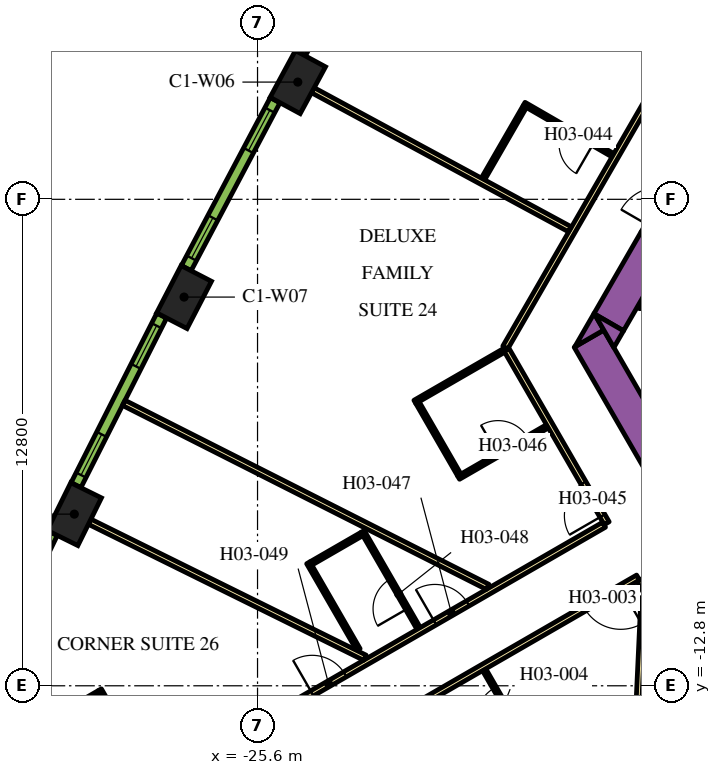
"""IFC4 building model, lengths in metres.
Left out: names, types, materials, properties, quantities, classifications, styles, units other than length and angle.
Written with IfcOpenShell. Run it as: python <this file> out.ifc"""

import sys

from ifc_helpers import new_model, si_unit, direction, frame, frame_2d, origin, origin_2d, place, context, subcontext, project, spatial, polyline, rectangle, outline, extrude, element, fill, save


model = new_model("IFC4")
c1 = context("Model", 3, precision=1e-05, world=origin(), true_north=direction((0.0, 1.0)))
c2 = subcontext(c1, "Body", "Model", "MODEL_VIEW")
j1 = project(units=[si_unit("LENGTHUNIT", "METRE"), si_unit("PLANEANGLEUNIT", "RADIAN")], contexts=[c1])
p1 = place(None, origin())
s1 = spatial("IfcSite", under=j1, at=p1, CompositionType="ELEMENT")
p2 = place(p1, origin())
s2 = spatial("IfcBuilding", under=s1, at=p2, CompositionType="ELEMENT")
p3 = place(p2, frame((0.0, 0.0, 54.9)))
s3 = spatial("IfcBuildingStorey", under=s2, at=p3, CompositionType="ELEMENT", Elevation=54.9)
for number, where, z_axis, x_axis in (
    (1, (-24.54, 3.085, 0.0), (0.0, 0.0, 1.0), (-0.476, -0.88, 0.0)),
    (2, (-27.533, -2.572, 0.0), (0.0, 0.0, 1.0), (-0.459, -0.888, 0.0)),
    (3, (-30.421, -8.284, 0.0), (0.0, 0.0, 1.0), (-0.443, -0.897, 0.0)),
):
    element("IfcColumn", number, at=place(p3, frame(where, z_axis=z_axis, x_axis=x_axis)), inside=s3, PredefinedType="COLUMN", context=c2, shape_type="SweptSolid", body=[
        extrude(rectangle(XDim=1.4, YDim=0.9, at=origin_2d()), origin(), (0.0, 0.0, 1.0), 3.9),
    ])
p4 = place(p3, frame((-12.134, -11.883, 0.0), z_axis=(0.0, 0.0, 1.0), x_axis=(-0.500005339912, 0.866022320763, 0.0)))
e4 = element("IfcWall", 4, at=p4, inside=s3, PredefinedType="SOLIDWALL", context=c2, shape_type="SweptSolid", body=[
    extrude(rectangle(XDim=9.488, YDim=0.9, at=frame_2d((4.744, 0.0))), origin(), (0.0, 0.0, 1.0), 3.9),
])
p5 = place(p3, origin())
e5 = element("IfcWall", 5, at=p5, inside=s3, PredefinedType="SOLIDWALL", context=c2, shape_type="SweptSolid", body=[
    extrude(outline(polyline([(-16.489, -3.44), (-17.251, -3.88), (-16.743, -3.0), (-16.489, -3.44)])), origin(), (0.0, 0.0, 1.0), 3.9),
])
p6 = place(p3, frame((-15.118, -1.085, 0.0), z_axis=(0.0, 0.0, 1.0), x_axis=(-0.50006606081, -0.865987260198, 0.0)))
e6 = element("IfcWall", 6, at=p6, inside=s3, PredefinedType="SOLIDWALL", context=c2, shape_type="SweptSolid", body=[
    extrude(rectangle(XDim=2.481, YDim=0.9, at=frame_2d((1.24, 0.0))), origin(), (0.0, 0.0, 1.0), 3.9),
])
e7 = element("IfcWall", 7, at=p5, inside=s3, PredefinedType="SOLIDWALL", context=c2, shape_type="SweptSolid", body=[
    extrude(outline(polyline([(-16.223, -3.9), (-16.732, -3.02), (-15.969, -3.46), (-16.223, -3.9)])), origin(), (0.0, 0.0, 1.0), 3.9),
])
p7 = place(p3, frame((-12.915, -2.8, 0.0), z_axis=(0.0, 0.0, 1.0), x_axis=(-1.0, 0.0, 0.0)))
e8 = element("IfcWall", 8, at=p7, inside=s3, PredefinedType="PARTITIONING", context=c2, shape_type="SweptSolid", body=[
    extrude(rectangle(XDim=2.637, YDim=0.15, at=frame_2d((1.318, 0.0))), origin(), (0.0, 0.0, 1.0), 2.75),
])
p8 = place(p3, frame((-19.081, -3.9, 0.0), z_axis=(0.0, 0.0, 1.0), x_axis=(0.499998313975, 0.866026377209, 0.0)))
e9 = element("IfcWall", 9, at=p8, inside=s3, PredefinedType="PARTITIONING", context=c2, shape_type="SweptSolid", body=[
    extrude(rectangle(XDim=25.766, YDim=0.15, at=frame_2d((12.883, 0.0))), origin(), (0.0, 0.0, 1.0), 2.75),
])
p9 = place(p8, frame((22.445, 0.0, 0.0)))
e10 = element("IfcOpeningElement", 10, at=p9, cuts=e9, PredefinedType="OPENING", context=c2, shape_type="SweptSolid", body=[
    extrude(rectangle(XDim=1.0, YDim=2.1, at=frame_2d((0.5, 1.05))), frame((0.0, 0.085, 0.0), z_axis=(0.0, -1.0, 0.0), x_axis=(1.0, 0.0, 0.0)), (0.0, 0.0, 1.0), 0.17),
])
p10 = place(p8, frame((21.138, 0.0, 0.0)))
e11 = element("IfcOpeningElement", 11, at=p10, cuts=e9, PredefinedType="OPENING", context=c2, shape_type="SweptSolid", body=[
    extrude(rectangle(XDim=1.0, YDim=2.1, at=frame_2d((0.5, 1.05))), frame((0.0, 0.085, 0.0), z_axis=(0.0, -1.0, 0.0), x_axis=(1.0, 0.0, 0.0)), (0.0, 0.0, 1.0), 0.17),
])
p11 = place(p8, frame((14.066, 0.0, 0.0)))
e12 = element("IfcOpeningElement", 12, at=p11, cuts=e9, PredefinedType="OPENING", context=c2, shape_type="SweptSolid", body=[
    extrude(rectangle(XDim=0.9, YDim=2.1, at=frame_2d((0.45, 1.05))), frame((0.0, 0.085, 0.0), z_axis=(0.0, -1.0, 0.0), x_axis=(1.0, 0.0, 0.0)), (0.0, 0.0, 1.0), 0.17),
])
p12 = place(p8, frame((11.693, 0.0, 0.0)))
e13 = element("IfcOpeningElement", 13, at=p12, cuts=e9, PredefinedType="OPENING", context=c2, shape_type="SweptSolid", body=[
    extrude(rectangle(XDim=1.0, YDim=2.1, at=frame_2d((0.5, 1.05))), frame((0.0, 0.085, 0.0), z_axis=(0.0, -1.0, 0.0), x_axis=(1.0, 0.0, 0.0)), (0.0, 0.0, 1.0), 0.17),
])
p13 = place(p3, frame((-16.412, -8.523, 0.0), z_axis=(0.0, 0.0, 1.0), x_axis=(-0.500001929737, 0.866024289647, 0.0)))
e14 = element("IfcWall", 14, at=p13, inside=s3, PredefinedType="PARTITIONING", context=c2, shape_type="SweptSolid", body=[
    extrude(rectangle(XDim=5.268, YDim=0.15, at=frame_2d((2.634, 0.0))), origin(), (0.0, 0.0, 1.0), 2.75),
])
p14 = place(p13, frame((0.226, 0.0, 0.0)))
e15 = element("IfcOpeningElement", 15, at=p14, cuts=e14, PredefinedType="OPENING", context=c2, shape_type="SweptSolid", body=[
    extrude(rectangle(XDim=1.0, YDim=2.1, at=frame_2d((0.5, 1.05))), frame((0.0, 0.085, 0.0), z_axis=(0.0, -1.0, 0.0), x_axis=(1.0, 0.0, 0.0)), (0.0, 0.0, 1.0), 0.17),
])
p15 = place(p3, frame((-30.463, -16.635, 0.0), z_axis=(0.0, 0.0, 1.0), x_axis=(0.866022394896, 0.500005211512, 0.0)))
e16 = element("IfcWall", 16, at=p15, inside=s3, PredefinedType="PARTITIONING", context=c2, shape_type="SweptSolid", body=[
    extrude(rectangle(XDim=16.144, YDim=0.15, at=frame_2d((8.072, 0.0))), origin(), (0.0, 0.0, 1.0), 2.75),
])
p16 = place(p15, frame((11.004, 0.0, 0.0)))
e17 = element("IfcOpeningElement", 17, at=p16, cuts=e16, PredefinedType="OPENING", context=c2, shape_type="SweptSolid", body=[
    extrude(rectangle(XDim=1.0, YDim=2.1, at=frame_2d((0.5, 1.05))), frame((0.0, 0.085, 0.0), z_axis=(0.0, -1.0, 0.0), x_axis=(1.0, 0.0, 0.0)), (0.0, 0.0, 1.0), 0.17),
])
p17 = place(p15, frame((7.274, 0.0, 0.0)))
e18 = element("IfcOpeningElement", 18, at=p17, cuts=e16, PredefinedType="OPENING", context=c2, shape_type="SweptSolid", body=[
    extrude(rectangle(XDim=1.0, YDim=2.1, at=frame_2d((0.5, 1.05))), frame((0.0, 0.085, 0.0), z_axis=(0.0, -1.0, 0.0), x_axis=(1.0, 0.0, 0.0)), (0.0, 0.0, 1.0), 0.17),
])
p18 = place(p3, frame((-15.587, -9.952, 0.0), z_axis=(0.0, 0.0, 1.0), x_axis=(-0.866022197818, -0.500005552856, 0.0)))
e19 = element("IfcWall", 19, at=p18, inside=s3, PredefinedType="PARTITIONING", context=c2, shape_type="SweptSolid", body=[
    extrude(rectangle(XDim=16.224, YDim=0.15, at=frame_2d((8.112, 0.0))), origin(), (0.0, 0.0, 1.0), 2.75),
])
p19 = place(p18, frame((7.949, 0.0, 0.0)))
e20 = element("IfcOpeningElement", 20, at=p19, cuts=e19, PredefinedType="OPENING", context=c2, shape_type="SweptSolid", body=[
    extrude(rectangle(XDim=1.0, YDim=2.1, at=frame_2d((0.5, 1.05))), frame((0.0, 0.085, 0.0), z_axis=(0.0, -1.0, 0.0), x_axis=(1.0, 0.0, 0.0)), (0.0, 0.0, 1.0), 0.17),
])
p20 = place(p18, frame((0.525, 0.0, 0.0)))
e21 = element("IfcOpeningElement", 21, at=p20, cuts=e19, PredefinedType="OPENING", context=c2, shape_type="SweptSolid", body=[
    extrude(rectangle(XDim=1.1, YDim=2.1, at=frame_2d((0.55, 1.05))), frame((0.0, 0.085, 0.0), z_axis=(0.0, -1.0, 0.0), x_axis=(1.0, 0.0, 0.0)), (0.0, 0.0, 1.0), 0.17),
])
p21 = place(p3, frame((-12.918, -14.575, 0.0), z_axis=(0.0, 0.0, 1.0), x_axis=(-0.500009150678, 0.866020120573, 0.0)))
e22 = element("IfcWall", 22, at=p21, inside=s3, PredefinedType="PARTITIONING", context=c2, shape_type="SweptSolid", body=[
    extrude(rectangle(XDim=5.258, YDim=0.15, at=frame_2d((2.629, 0.0))), origin(), (0.0, 0.0, 1.0), 2.75),
])
p22 = place(p3, frame((-30.018, -8.483, 0.0), z_axis=(0.0, 0.0, 1.0), x_axis=(0.896544505264, -0.44295366584, 0.0)))
e23 = element("IfcWall", 23, at=p22, inside=s3, PredefinedType="PARTITIONING", context=c2, shape_type="SweptSolid", body=[
    extrude(rectangle(XDim=8.079, YDim=0.15, at=frame_2d((4.04, 0.0))), origin(), (0.0, 0.0, 1.0), 2.75),
])
p23 = place(p3, frame((-29.12, -5.356, 0.0), z_axis=(0.0, 0.0, 1.0), x_axis=(0.892401965553, -0.451241323327, 0.0)))
e24 = element("IfcWall", 24, at=p23, inside=s3, PredefinedType="PARTITIONING", context=c2, shape_type="SweptSolid", body=[
    extrude(rectangle(XDim=10.729, YDim=0.15, at=frame_2d((5.364, 0.0))), origin(), (0.0, 0.0, 1.0), 2.75),
])
p24 = place(p3, frame((-24.145, 2.871, 0.0), z_axis=(0.0, 0.0, 1.0), x_axis=(0.879551725039, -0.475803281809, 0.0)))
e25 = element("IfcWall", 25, at=p24, inside=s3, PredefinedType="PARTITIONING", context=c2, shape_type="SweptSolid", body=[
    extrude(rectangle(XDim=7.688, YDim=0.15, at=frame_2d((3.844, 0.0))), origin(), (0.0, 0.0, 1.0), 2.75),
])
p25 = place(p3, frame((-15.973, -22.109, 0.0), z_axis=(0.0, 0.0, 1.0), x_axis=(0.046191717129, 0.998932592955, 0.0)))
e26 = element("IfcWall", 26, at=p25, inside=s3, PredefinedType="PARTITIONING", context=c2, shape_type="SweptSolid", body=[
    extrude(rectangle(XDim=11.638, YDim=0.15, at=frame_2d((5.819, 0.0))), origin(), (0.0, 0.0, 1.0), 2.75),
])
p26 = place(p3, frame((-18.237, -14.802, 0.0), z_axis=(0.0, 0.0, 1.0), x_axis=(-0.49994636267, 0.866056369097, 0.0)))
e27 = element("IfcWall", 27, at=p26, inside=s3, PredefinedType="PARTITIONING", context=c2, shape_type="SweptSolid", body=[
    extrude(rectangle(XDim=2.8, YDim=0.1, at=frame_2d((1.4, 0.0))), origin(), (0.0, 0.0, 1.0), 2.75),
])
p27 = place(p26, frame((1.25, 0.0, 0.0)))
e28 = element("IfcOpeningElement", 28, at=p27, cuts=e27, PredefinedType="OPENING", context=c2, shape_type="SweptSolid", body=[
    extrude(rectangle(XDim=1.0, YDim=2.1, at=frame_2d((0.5, 1.05))), frame((0.0, 0.06, 0.0), z_axis=(0.0, -1.0, 0.0), x_axis=(1.0, 0.0, 0.0)), (0.0, 0.0, 1.0), 0.12),
])
p28 = place(p3, frame((-16.247, 1.159, 0.0), z_axis=(0.0, 0.0, 1.0), x_axis=(-0.866059108428, 0.4999416173, 0.0)))
e29 = element("IfcWall", 29, at=p28, inside=s3, PredefinedType="PARTITIONING", context=c2, shape_type="SweptSolid", body=[
    extrude(rectangle(XDim=2.7, YDim=0.1, at=frame_2d((1.35, 0.0))), origin(), (0.0, 0.0, 1.0), 2.75),
])
p29 = place(p28, frame((0.6, 0.0, 0.0)))
e30 = element("IfcOpeningElement", 30, at=p29, cuts=e29, PredefinedType="OPENING", context=c2, shape_type="SweptSolid", body=[
    extrude(rectangle(XDim=0.9, YDim=2.1, at=frame_2d((0.45, 1.05))), frame((0.0, 0.06, 0.0), z_axis=(0.0, -1.0, 0.0), x_axis=(1.0, 0.0, 0.0)), (0.0, 0.0, 1.0), 0.12),
])
p30 = place(p3, frame((-18.567, 2.441, 0.0), z_axis=(0.0, 0.0, 1.0), x_axis=(-0.499946605688, -0.86605622881, 0.0)))
e31 = element("IfcWall", 31, at=p30, inside=s3, PredefinedType="PARTITIONING", context=c2, shape_type="SweptSolid", body=[
    extrude(rectangle(XDim=2.2, YDim=0.1, at=frame_2d((1.1, 0.0))), origin(), (0.0, 0.0, 1.0), 2.75),
])
p31 = place(p3, frame((-20.31, -7.323, 0.0), z_axis=(0.0, 0.0, 1.0), x_axis=(0.86599734893, 0.500048589285, 0.0)))
e32 = element("IfcWall", 32, at=p31, inside=s3, PredefinedType="PARTITIONING", context=c2, shape_type="SweptSolid", body=[
    extrude(rectangle(XDim=2.7, YDim=0.1, at=frame_2d((1.35, 0.0))), origin(), (0.0, 0.0, 1.0), 2.75),
])
p32 = place(p31, frame((1.2, 0.0, 0.0)))
e33 = element("IfcOpeningElement", 33, at=p32, cuts=e32, PredefinedType="OPENING", context=c2, shape_type="SweptSolid", body=[
    extrude(rectangle(XDim=0.9, YDim=2.1, at=frame_2d((0.45, 1.05))), frame((0.0, 0.06, 0.0), z_axis=(0.0, -1.0, 0.0), x_axis=(1.0, 0.0, 0.0)), (0.0, 0.0, 1.0), 0.12),
])
p33 = place(p3, frame((-20.291, -7.254, 0.0), z_axis=(0.0, 0.0, 1.0), x_axis=(-0.50002983664, 0.866008176907, 0.0)))
e34 = element("IfcWall", 34, at=p33, inside=s3, PredefinedType="PARTITIONING", context=c2, shape_type="SweptSolid", body=[
    extrude(rectangle(XDim=2.2, YDim=0.1, at=frame_2d((1.1, 0.0))), origin(), (0.0, 0.0, 1.0), 2.75),
])
p34 = place(p3, frame((-19.121, -3.981, 0.0), z_axis=(0.0, 0.0, 1.0), x_axis=(-0.866019956843, -0.50000943426, 0.0)))
e35 = element("IfcWall", 35, at=p34, inside=s3, PredefinedType="PARTITIONING", context=c2, shape_type="SweptSolid", body=[
    extrude(rectangle(XDim=2.7, YDim=0.1, at=frame_2d((1.35, 0.0))), origin(), (0.0, 0.0, 1.0), 2.75),
])
p35 = place(p3, frame((-21.36, -11.293, 0.0), z_axis=(0.0, 0.0, 1.0), x_axis=(-0.49997559174, 0.866039495442, 0.0)))
e36 = element("IfcWall", 36, at=p35, inside=s3, PredefinedType="PARTITIONING", context=c2, shape_type="SweptSolid", body=[
    extrude(rectangle(XDim=2.95, YDim=0.1, at=frame_2d((1.475, 0.0))), origin(), (0.0, 0.0, 1.0), 2.75),
])
p36 = place(p35, frame((0.6, 0.0, 0.0)))
e37 = element("IfcOpeningElement", 37, at=p36, cuts=e36, PredefinedType="OPENING", context=c2, shape_type="SweptSolid", body=[
    extrude(rectangle(XDim=0.9, YDim=2.1, at=frame_2d((0.45, 1.05))), frame((0.0, 0.06, 0.0), z_axis=(0.0, -1.0, 0.0), x_axis=(1.0, 0.0, 0.0)), (0.0, 0.0, 1.0), 0.12),
])
p37 = place(p3, frame((-22.853, -8.806, 0.0), z_axis=(0.0, 0.0, 1.0), x_axis=(-0.86601511528, -0.500017819788, 0.0)))
e38 = element("IfcWall", 38, at=p37, inside=s3, PredefinedType="PARTITIONING", context=c2, shape_type="SweptSolid", body=[
    extrude(rectangle(XDim=1.55, YDim=0.1, at=frame_2d((0.775, 0.0))), origin(), (0.0, 0.0, 1.0), 2.75),
])
p38 = place(p3, frame((-22.944, -11.85, 0.0), z_axis=(0.0, 0.0, 1.0), x_axis=(-0.499938597367, 0.866060851709, 0.0)))
e39 = element("IfcWall", 39, at=p38, inside=s3, PredefinedType="PARTITIONING", context=c2, shape_type="SweptSolid", body=[
    extrude(rectangle(XDim=2.64, YDim=0.1, at=frame_2d((1.32, 0.0))), origin(), (0.0, 0.0, 1.0), 2.75),
])
p39 = place(p3, frame((-28.352, -15.33, 0.0), z_axis=(0.0, 0.0, 1.0), x_axis=(-0.500049511043, 0.865996816683, 0.0)))
e40 = element("IfcWall", 40, at=p39, inside=s3, PredefinedType="PARTITIONING", context=c2, shape_type="SweptSolid", body=[
    extrude(rectangle(XDim=2.8, YDim=0.1, at=frame_2d((1.4, 0.0))), origin(), (0.0, 0.0, 1.0), 2.75),
])
p40 = place(p39, frame((0.6, 0.0, 0.0)))
e41 = element("IfcOpeningElement", 41, at=p40, cuts=e40, PredefinedType="OPENING", context=c2, shape_type="SweptSolid", body=[
    extrude(rectangle(XDim=0.9, YDim=2.1, at=frame_2d((0.45, 1.05))), frame((0.0, 0.06, 0.0), z_axis=(0.0, -1.0, 0.0), x_axis=(1.0, 0.0, 0.0)), (0.0, 0.0, 1.0), 0.12),
])
p41 = place(p3, frame((-29.771, -12.973, 0.0), z_axis=(0.0, 0.0, 1.0), x_axis=(-0.865980596518, -0.500077600433, 0.0)))
e42 = element("IfcWall", 42, at=p41, inside=s3, PredefinedType="PARTITIONING", context=c2, shape_type="SweptSolid", body=[
    extrude(rectangle(XDim=2.4, YDim=0.1, at=frame_2d((1.2, 0.0))), origin(), (0.0, 0.0, 1.0), 2.75),
])
p42 = place(p3, frame((-22.05, 8.22, 0.0), z_axis=(0.0, 0.0, 1.0), x_axis=(-0.483912572871, -0.875116347589, 0.0)))
e43 = element("IfcWall", 43, at=p42, inside=s3, PredefinedType="SOLIDWALL", context=c2, shape_type="SweptSolid", body=[
    extrude(rectangle(XDim=4.998, YDim=0.29, at=frame_2d((2.499, 0.0))), origin(), (0.0, 0.0, 1.0), 3.65),
])
p43 = place(p42, frame((0.297, 0.0, 0.9)))
e44 = element("IfcOpeningElement", 44, at=p43, cuts=e43, PredefinedType="OPENING", context=c2, shape_type="SweptSolid", body=[
    extrude(rectangle(XDim=1.2, YDim=2.15, at=frame_2d((0.6, 1.075))), frame((0.0, 0.155, 0.0), z_axis=(0.0, -1.0, 0.0), x_axis=(1.0, 0.0, 0.0)), (0.0, 0.0, 1.0), 0.31),
])
p44 = place(p42, frame((3.501, 0.0, 0.9)))
e45 = element("IfcOpeningElement", 45, at=p44, cuts=e43, PredefinedType="OPENING", context=c2, shape_type="SweptSolid", body=[
    extrude(rectangle(XDim=1.2, YDim=2.15, at=frame_2d((0.6, 1.075))), frame((0.0, 0.155, 0.0), z_axis=(0.0, -1.0, 0.0), x_axis=(1.0, 0.0, 0.0)), (0.0, 0.0, 1.0), 0.31),
])
p45 = place(p3, frame((-25.138, 2.608, 0.0), z_axis=(0.0, 0.0, 1.0), x_axis=(-0.467629620899, -0.883924509026, 0.0)))
e46 = element("IfcWall", 46, at=p45, inside=s3, PredefinedType="SOLIDWALL", context=c2, shape_type="SweptSolid", body=[
    extrude(rectangle(XDim=4.998, YDim=0.29, at=frame_2d((2.499, 0.0))), origin(), (0.0, 0.0, 1.0), 3.65),
])
p46 = place(p45, frame((0.297, 0.0, 0.9)))
e47 = element("IfcOpeningElement", 47, at=p46, cuts=e46, PredefinedType="OPENING", context=c2, shape_type="SweptSolid", body=[
    extrude(rectangle(XDim=1.2, YDim=2.15, at=frame_2d((0.6, 1.075))), frame((0.0, 0.155, 0.0), z_axis=(0.0, -1.0, 0.0), x_axis=(1.0, 0.0, 0.0)), (0.0, 0.0, 1.0), 0.31),
])
p47 = place(p45, frame((3.501, 0.0, 0.9)))
e48 = element("IfcOpeningElement", 48, at=p47, cuts=e46, PredefinedType="OPENING", context=c2, shape_type="SweptSolid", body=[
    extrude(rectangle(XDim=1.2, YDim=2.15, at=frame_2d((0.6, 1.075))), frame((0.0, 0.155, 0.0), z_axis=(0.0, -1.0, 0.0), x_axis=(1.0, 0.0, 0.0)), (0.0, 0.0, 1.0), 0.31),
])
p48 = place(p3, frame((-28.122, -3.06, 0.0), z_axis=(0.0, 0.0, 1.0), x_axis=(-0.451233929645, -0.892405704115, 0.0)))
e49 = element("IfcWall", 49, at=p48, inside=s3, PredefinedType="SOLIDWALL", context=c2, shape_type="SweptSolid", body=[
    extrude(rectangle(XDim=4.998, YDim=0.29, at=frame_2d((2.499, 0.0))), origin(), (0.0, 0.0, 1.0), 3.65),
])
p49 = place(p48, frame((0.297, 0.0, 0.9)))
e50 = element("IfcOpeningElement", 50, at=p49, cuts=e49, PredefinedType="OPENING", context=c2, shape_type="SweptSolid", body=[
    extrude(rectangle(XDim=1.2, YDim=2.15, at=frame_2d((0.6, 1.075))), frame((0.0, 0.155, 0.0), z_axis=(0.0, -1.0, 0.0), x_axis=(1.0, 0.0, 0.0)), (0.0, 0.0, 1.0), 0.31),
])
p50 = place(p48, frame((3.501, 0.0, 0.9)))
e51 = element("IfcOpeningElement", 51, at=p50, cuts=e49, PredefinedType="OPENING", context=c2, shape_type="SweptSolid", body=[
    extrude(rectangle(XDim=1.2, YDim=2.15, at=frame_2d((0.6, 1.075))), frame((0.0, 0.155, 0.0), z_axis=(0.0, -1.0, 0.0), x_axis=(1.0, 0.0, 0.0)), (0.0, 0.0, 1.0), 0.31),
])
p51 = place(p3, frame((-31.0, -8.782, 0.0), z_axis=(0.0, 0.0, 1.0), x_axis=(-0.434664499056, -0.900592456808, 0.0)))
e52 = element("IfcWall", 52, at=p51, inside=s3, PredefinedType="SOLIDWALL", context=c2, shape_type="SweptSolid", body=[
    extrude(rectangle(XDim=5.006, YDim=0.29, at=frame_2d((2.503, 0.0))), origin(), (0.0, 0.0, 1.0), 3.65),
])
p52 = place(p51, frame((0.31, 0.0, 0.9)))
e53 = element("IfcOpeningElement", 53, at=p52, cuts=e52, PredefinedType="OPENING", context=c2, shape_type="SweptSolid", body=[
    extrude(rectangle(XDim=1.2, YDim=2.15, at=frame_2d((0.6, 1.075))), frame((0.0, 0.155, 0.0), z_axis=(0.0, -1.0, 0.0), x_axis=(1.0, 0.0, 0.0)), (0.0, 0.0, 1.0), 0.31),
])
p53 = place(p51, frame((3.541, 0.0, 0.9)))
e54 = element("IfcOpeningElement", 54, at=p53, cuts=e52, PredefinedType="OPENING", context=c2, shape_type="SweptSolid", body=[
    extrude(rectangle(XDim=1.2, YDim=2.15, at=frame_2d((0.6, 1.075))), frame((0.0, 0.155, 0.0), z_axis=(0.0, -1.0, 0.0), x_axis=(1.0, 0.0, 0.0)), (0.0, 0.0, 1.0), 0.31),
])
p54 = place(p20, origin())
e55 = element("IfcDoor", 55, at=p54, inside=s3, OperationType="SINGLE_SWING_LEFT", PredefinedType="DOOR", context=c2, shape_type="SweptSolid", body=[
    extrude(rectangle(XDim=1.1, YDim=2.1, at=frame_2d((0.55, 1.05))), frame((0.0, 0.025, 0.0), z_axis=(0.0, -1.0, 0.0), x_axis=(1.0, 0.0, 0.0)), (0.0, 0.0, 1.0), 0.05),
])
fill(e21, e55)
p55 = place(p27, origin())
e56 = element("IfcDoor", 56, at=p55, inside=s3, OperationType="SINGLE_SWING_LEFT", PredefinedType="DOOR", context=c2, shape_type="SweptSolid", body=[
    extrude(rectangle(XDim=1.0, YDim=2.1, at=frame_2d((0.5, 1.05))), frame((0.0, 0.025, 0.0), z_axis=(0.0, -1.0, 0.0), x_axis=(1.0, 0.0, 0.0)), (0.0, 0.0, 1.0), 0.05),
])
fill(e28, e56)
p56 = place(p29, origin())
e57 = element("IfcDoor", 57, at=p56, inside=s3, OperationType="SINGLE_SWING_LEFT", PredefinedType="DOOR", context=c2, shape_type="SweptSolid", body=[
    extrude(rectangle(XDim=0.9, YDim=2.1, at=frame_2d((0.45, 1.05))), frame((0.0, 0.025, 0.0), z_axis=(0.0, -1.0, 0.0), x_axis=(1.0, 0.0, 0.0)), (0.0, 0.0, 1.0), 0.05),
])
fill(e30, e57)
p57 = place(p14, origin())
e58 = element("IfcDoor", 58, at=p57, inside=s3, OperationType="SINGLE_SWING_LEFT", PredefinedType="DOOR", context=c2, shape_type="SweptSolid", body=[
    extrude(rectangle(XDim=1.0, YDim=2.1, at=frame_2d((0.5, 1.05))), frame((0.0, 0.025, 0.0), z_axis=(0.0, -1.0, 0.0), x_axis=(1.0, 0.0, 0.0)), (0.0, 0.0, 1.0), 0.05),
])
fill(e15, e58)
p58 = place(p32, origin())
e59 = element("IfcDoor", 59, at=p58, inside=s3, OperationType="SINGLE_SWING_RIGHT", PredefinedType="DOOR", context=c2, shape_type="SweptSolid", body=[
    extrude(rectangle(XDim=0.9, YDim=2.1, at=frame_2d((0.45, 1.05))), frame((0.0, 0.025, 0.0), z_axis=(0.0, -1.0, 0.0), x_axis=(1.0, 0.0, 0.0)), (0.0, 0.0, 1.0), 0.05),
])
fill(e33, e59)
p59 = place(p16, origin())
e60 = element("IfcDoor", 60, at=p59, inside=s3, OperationType="SINGLE_SWING_RIGHT", PredefinedType="DOOR", context=c2, shape_type="SweptSolid", body=[
    extrude(rectangle(XDim=1.0, YDim=2.1, at=frame_2d((0.5, 1.05))), frame((0.0, 0.025, 0.0), z_axis=(0.0, -1.0, 0.0), x_axis=(1.0, 0.0, 0.0)), (0.0, 0.0, 1.0), 0.05),
])
fill(e17, e60)
p60 = place(p36, origin())
e61 = element("IfcDoor", 61, at=p60, inside=s3, OperationType="SINGLE_SWING_LEFT", PredefinedType="DOOR", context=c2, shape_type="SweptSolid", body=[
    extrude(rectangle(XDim=0.9, YDim=2.1, at=frame_2d((0.45, 1.05))), frame((0.0, 0.025, 0.0), z_axis=(0.0, -1.0, 0.0), x_axis=(1.0, 0.0, 0.0)), (0.0, 0.0, 1.0), 0.05),
])
fill(e37, e61)
p61 = place(p17, origin())
e62 = element("IfcDoor", 62, at=p61, inside=s3, OperationType="SINGLE_SWING_RIGHT", PredefinedType="DOOR", context=c2, shape_type="SweptSolid", body=[
    extrude(rectangle(XDim=1.0, YDim=2.1, at=frame_2d((0.5, 1.05))), frame((0.0, 0.025, 0.0), z_axis=(0.0, -1.0, 0.0), x_axis=(1.0, 0.0, 0.0)), (0.0, 0.0, 1.0), 0.05),
])
fill(e18, e62)
p62 = place(p46, origin())
e63 = element("IfcWindow", 63, at=p62, inside=s3, PartitioningType="DOUBLE_PANEL_VERTICAL", PredefinedType="WINDOW", context=c2, shape_type="SweptSolid", body=[
    extrude(rectangle(XDim=1.2, YDim=2.15, at=frame_2d((0.6, 1.075))), frame((0.0, 0.015, 0.0), z_axis=(0.0, -1.0, 0.0), x_axis=(1.0, 0.0, 0.0)), (0.0, 0.0, 1.0), 0.06),
])
fill(e47, e63)
p63 = place(p47, origin())
e64 = element("IfcWindow", 64, at=p63, inside=s3, PartitioningType="DOUBLE_PANEL_VERTICAL", PredefinedType="WINDOW", context=c2, shape_type="SweptSolid", body=[
    extrude(rectangle(XDim=1.2, YDim=2.15, at=frame_2d((0.6, 1.075))), frame((0.0, 0.015, 0.0), z_axis=(0.0, -1.0, 0.0), x_axis=(1.0, 0.0, 0.0)), (0.0, 0.0, 1.0), 0.06),
])
fill(e48, e64)
p64 = place(p49, origin())
e65 = element("IfcWindow", 65, at=p64, inside=s3, PartitioningType="DOUBLE_PANEL_VERTICAL", PredefinedType="WINDOW", context=c2, shape_type="SweptSolid", body=[
    extrude(rectangle(XDim=1.2, YDim=2.15, at=frame_2d((0.6, 1.075))), frame((0.0, 0.015, 0.0), z_axis=(0.0, -1.0, 0.0), x_axis=(1.0, 0.0, 0.0)), (0.0, 0.0, 1.0), 0.06),
])
fill(e50, e65)
p65 = place(p50, origin())
e66 = element("IfcWindow", 66, at=p65, inside=s3, PartitioningType="DOUBLE_PANEL_VERTICAL", PredefinedType="WINDOW", context=c2, shape_type="SweptSolid", body=[
    extrude(rectangle(XDim=1.2, YDim=2.15, at=frame_2d((0.6, 1.075))), frame((0.0, 0.015, 0.0), z_axis=(0.0, -1.0, 0.0), x_axis=(1.0, 0.0, 0.0)), (0.0, 0.0, 1.0), 0.06),
])
fill(e51, e66)
save(model, sys.argv[1])
